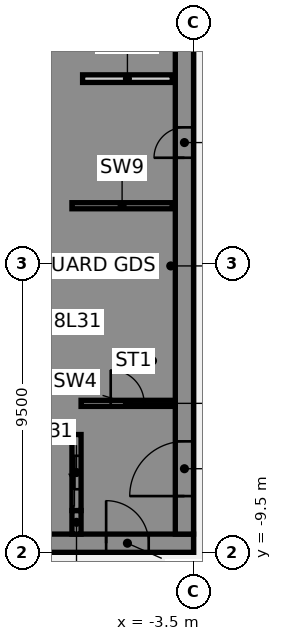
"""IFC4 building model, lengths in metres.
Left out: names, types, materials, properties, quantities, classifications, styles, units other than length and angle.
Written with IfcOpenShell. Run it as: python <this file> out.ifc"""

import sys

from ifc_helpers import new_model, si_unit, direction, frame, frame_2d, origin, place, context, subcontext, project, spatial, polyline, rectangle, outline, extrude, element, fill, save


model = new_model("IFC4")
c1 = context("Model", 3, precision=1e-05, world=origin(), true_north=direction((0.0, 1.0)))
c2 = subcontext(c1, "Body", "Model", "MODEL_VIEW")
j1 = project(units=[si_unit("LENGTHUNIT", "METRE"), si_unit("PLANEANGLEUNIT", "RADIAN")], contexts=[c1])
p1 = place(None, origin())
s1 = spatial("IfcSite", under=j1, at=p1, CompositionType="ELEMENT")
p2 = place(p1, origin())
s2 = spatial("IfcBuilding", under=s1, at=p2, CompositionType="ELEMENT")
p3 = place(p2, frame((0.0, 0.0, 128.5)))
s3 = spatial("IfcBuildingStorey", under=s2, at=p3, CompositionType="ELEMENT", Elevation=128.5)
p4 = place(p3, frame((-16.5, -9.2, 0.0), z_axis=(0.0, 0.0, 1.0), x_axis=(1.0, 0.0, 0.0)))
e1 = element("IfcWall", 1, at=p4, inside=s3, PredefinedType="SHEAR", context=c2, shape_type="SweptSolid", body=[
    extrude(rectangle(XDim=13.0, YDim=0.6, at=frame_2d((6.5, 0.0))), origin(), (0.0, 0.0, 1.0), 4.36),
])
p5 = place(p4, frame((4.15, 0.0, 0.0)))
e2 = element("IfcOpeningElement", 2, at=p5, cuts=e1, PredefinedType="OPENING", context=c2, shape_type="SweptSolid", body=[
    extrude(rectangle(XDim=1.4, YDim=2.1, at=frame_2d((0.7, 1.05))), frame((0.0, 0.31, 0.0), z_axis=(0.0, -1.0, 0.0), x_axis=(1.0, 0.0, 0.0)), (0.0, 0.0, 1.0), 0.62),
])
p6 = place(p4, frame((10.125, 0.0, 0.0)))
e3 = element("IfcOpeningElement", 3, at=p6, cuts=e1, PredefinedType="OPENING", context=c2, shape_type="SweptSolid", body=[
    extrude(rectangle(XDim=1.4, YDim=2.1, at=frame_2d((0.7, 1.05))), frame((0.0, 0.31, 0.0), z_axis=(0.0, -1.0, 0.0), x_axis=(1.0, 0.0, 0.0)), (0.0, 0.0, 1.0), 0.62),
])
p7 = place(p3, origin())
e4 = element("IfcWall", 4, at=p7, inside=s3, PredefinedType="SHEAR", context=c2, shape_type="SweptSolid", body=[
    extrude(outline(polyline([(-9.8, -5.375), (-9.8, -5.625), (-7.5, -5.625), (-7.2, -5.625), (-7.2, 8.9), (-7.5, 8.9), (-9.8, 8.9), (-9.8, 8.125), (-7.5, 8.125), (-7.5, 5.625), (-9.8, 5.625), (-9.8, 5.375), (-7.5, 5.375), (-7.5, 2.875), (-9.8, 2.875), (-9.8, 2.625), (-7.5, 2.625), (-7.5, 0.125), (-9.8, 0.125), (-9.8, -0.125), (-7.5, -0.125), (-7.5, -2.625), (-9.8, -2.625), (-9.8, -2.875), (-7.5, -2.875), (-7.5, -5.375), (-9.8, -5.375)])), origin(), (0.0, 0.0, 1.0), 4.36),
])
p8 = place(p3, origin())
e5 = element("IfcWall", 5, at=p8, inside=s3, PredefinedType="SHEAR", context=c2, shape_type="SweptSolid", body=[
    extrude(outline(polyline([(-7.5, -8.125), (-9.55, -8.125), (-9.55, -5.625), (-9.8, -5.625), (-9.8, -8.125), (-9.8, -8.9), (-7.5, -8.9), (-7.5, -8.125)])), origin(), (0.0, 0.0, 1.0), 4.36),
])
p9 = place(p3, frame((-7.35, -8.9, 0.0), z_axis=(0.0, 0.0, 1.0), x_axis=(0.0, 1.0, 0.0)))
e6 = element("IfcWall", 6, at=p9, inside=s3, PredefinedType="SHEAR", context=c2, shape_type="SweptSolid", body=[
    extrude(rectangle(XDim=0.775, YDim=0.3, at=frame_2d((0.387, 0.0))), origin(), (0.0, 0.0, 1.0), 4.36),
])
p10 = place(p3, frame((-7.5, 1.9, 0.0), z_axis=(0.0, 0.0, 1.0), x_axis=(1.0, 0.0, 0.0)))
e7 = element("IfcWall", 7, at=p10, inside=s3, PredefinedType="SHEAR", context=c2, shape_type="SweptSolid", body=[
    extrude(rectangle(XDim=3.3, YDim=0.2, at=frame_2d((1.65, 0.0))), origin(), (0.0, 0.0, 1.0), 4.36),
])
p11 = place(p3, frame((-7.35, -8.125, 0.0), z_axis=(0.0, 0.0, 1.0), x_axis=(0.0, 1.0, 0.0)))
e8 = element("IfcWall", 8, at=p11, inside=s3, PredefinedType="SHEAR", context=c2, shape_type="SweptSolid", body=[
    extrude(rectangle(XDim=2.5, YDim=0.3, at=frame_2d((1.25, 0.0))), origin(), (0.0, 0.0, 1.0), 4.36),
])
p12 = place(p11, frame((0.7, 0.0, 0.0)))
e9 = element("IfcOpeningElement", 9, at=p12, cuts=e8, PredefinedType="OPENING", context=c2, shape_type="SweptSolid", body=[
    extrude(rectangle(XDim=1.1, YDim=2.1, at=frame_2d((0.55, 1.05))), frame((0.0, 0.16, 0.0), z_axis=(0.0, -1.0, 0.0), x_axis=(1.0, 0.0, 0.0)), (0.0, 0.0, 1.0), 0.32),
])
p13 = place(p3, frame((-3.8, -8.9, 0.0), z_axis=(0.0, 0.0, 1.0), x_axis=(0.0, 1.0, 0.0)))
e10 = element("IfcWall", 10, at=p13, inside=s3, PredefinedType="SHEAR", context=c2, shape_type="SweptSolid", body=[
    extrude(rectangle(XDim=17.8, YDim=0.6, at=frame_2d((8.9, 0.0))), origin(), (0.0, 0.0, 1.0), 4.36),
])
p14 = place(p13, frame((1.25, 0.0, 0.0)))
e11 = element("IfcOpeningElement", 11, at=p14, cuts=e10, PredefinedType="OPENING", context=c2, shape_type="SweptSolid", body=[
    extrude(rectangle(XDim=1.8, YDim=2.1, at=frame_2d((0.9, 1.05))), frame((0.0, 0.31, 0.0), z_axis=(0.0, -1.0, 0.0), x_axis=(1.0, 0.0, 0.0)), (0.0, 0.0, 1.0), 0.62),
])
p15 = place(p13, frame((12.377, 0.0, 0.0)))
e12 = element("IfcOpeningElement", 12, at=p15, cuts=e10, PredefinedType="OPENING", context=c2, shape_type="SweptSolid", body=[
    extrude(rectangle(XDim=1.0, YDim=2.1, at=frame_2d((0.5, 1.05))), frame((0.0, 0.31, 0.0), z_axis=(0.0, -1.0, 0.0), x_axis=(1.0, 0.0, 0.0)), (0.0, 0.0, 1.0), 0.62),
])
p16 = place(p13, frame((15.903, 0.0, 0.0)))
e13 = element("IfcOpeningElement", 13, at=p16, cuts=e10, PredefinedType="OPENING", context=c2, shape_type="SweptSolid", body=[
    extrude(rectangle(XDim=1.0, YDim=2.1, at=frame_2d((0.5, 1.05))), frame((0.0, 0.31, 0.0), z_axis=(0.0, -1.0, 0.0), x_axis=(1.0, 0.0, 0.0)), (0.0, 0.0, 1.0), 0.62),
])
p17 = place(p3, frame((-7.15, 6.08, 0.0), z_axis=(0.0, 0.0, 1.0), x_axis=(1.0, 0.0, 0.0)))
e14 = element("IfcWall", 14, at=p17, inside=s3, PredefinedType="PARTITIONING", context=c2, shape_type="SweptSolid", body=[
    extrude(rectangle(XDim=2.95, YDim=0.25, at=frame_2d((1.475, 0.0))), origin(), (0.0, 0.0, 1.0), 4.36),
])
p18 = place(p3, frame((-7.2, -4.6, 0.0), z_axis=(0.0, 0.0, 1.0), x_axis=(1.0, 0.0, 0.0)))
e15 = element("IfcWall", 15, at=p18, inside=s3, PredefinedType="SHEAR", context=c2, shape_type="SweptSolid", body=[
    extrude(rectangle(XDim=3.1, YDim=0.2, at=frame_2d((1.55, 0.0))), origin(), (0.0, 0.0, 1.0), 4.36),
])
p19 = place(p18, frame((0.975, 0.0, 0.0)))
e16 = element("IfcOpeningElement", 16, at=p19, cuts=e15, PredefinedType="OPENING", context=c2, shape_type="SweptSolid", body=[
    extrude(rectangle(XDim=1.1, YDim=2.1, at=frame_2d((0.55, 1.05))), frame((0.0, 0.11, 0.0), z_axis=(0.0, -1.0, 0.0), x_axis=(1.0, 0.0, 0.0)), (0.0, 0.0, 1.0), 0.22),
])
p20 = place(p6, origin())
e17 = element("IfcDoor", 17, at=p20, inside=s3, OperationType="SINGLE_SWING_LEFT", PredefinedType="DOOR", context=c2, shape_type="SweptSolid", body=[
    extrude(rectangle(XDim=1.4, YDim=2.1, at=frame_2d((0.7, 1.05))), frame((0.0, 0.025, 0.0), z_axis=(0.0, -1.0, 0.0), x_axis=(1.0, 0.0, 0.0)), (0.0, 0.0, 1.0), 0.05),
])
fill(e3, e17)
p21 = place(p14, origin())
e18 = element("IfcDoor", 18, at=p21, inside=s3, OperationType="SINGLE_SWING_LEFT", PredefinedType="DOOR", context=c2, shape_type="SweptSolid", body=[
    extrude(rectangle(XDim=1.8, YDim=2.1, at=frame_2d((0.9, 1.05))), frame((0.0, 0.025, 0.0), z_axis=(0.0, -1.0, 0.0), x_axis=(1.0, 0.0, 0.0)), (0.0, 0.0, 1.0), 0.05),
])
fill(e11, e18)
p22 = place(p15, origin())
e19 = element("IfcDoor", 19, at=p22, inside=s3, OperationType="SINGLE_SWING_LEFT", PredefinedType="DOOR", context=c2, shape_type="SweptSolid", body=[
    extrude(rectangle(XDim=1.0, YDim=2.1, at=frame_2d((0.5, 1.05))), frame((0.0, 0.275, 0.0), z_axis=(0.0, -1.0, 0.0), x_axis=(1.0, 0.0, 0.0)), (0.0, 0.0, 1.0), 0.05),
])
fill(e12, e19)
p23 = place(p19, origin())
e20 = element("IfcDoor", 20, at=p23, inside=s3, OperationType="SINGLE_SWING_LEFT", PredefinedType="DOOR", context=c2, shape_type="SweptSolid", body=[
    extrude(rectangle(XDim=1.1, YDim=2.1, at=frame_2d((0.55, 1.05))), frame((0.0, 0.025, 0.0), z_axis=(0.0, -1.0, 0.0), x_axis=(1.0, 0.0, 0.0)), (0.0, 0.0, 1.0), 0.05),
])
fill(e16, e20)
p24 = place(p12, origin())
e21 = element("IfcDoor", 21, at=p24, inside=s3, OperationType="SLIDING_TO_LEFT", PredefinedType="DOOR", context=c2, shape_type="SweptSolid", body=[
    extrude(rectangle(XDim=1.1, YDim=2.1, at=frame_2d((0.55, 1.05))), frame((0.0, 0.025, 0.0), z_axis=(0.0, -1.0, 0.0), x_axis=(1.0, 0.0, 0.0)), (0.0, 0.0, 1.0), 0.05),
])
fill(e9, e21)
save(model, sys.argv[1])
